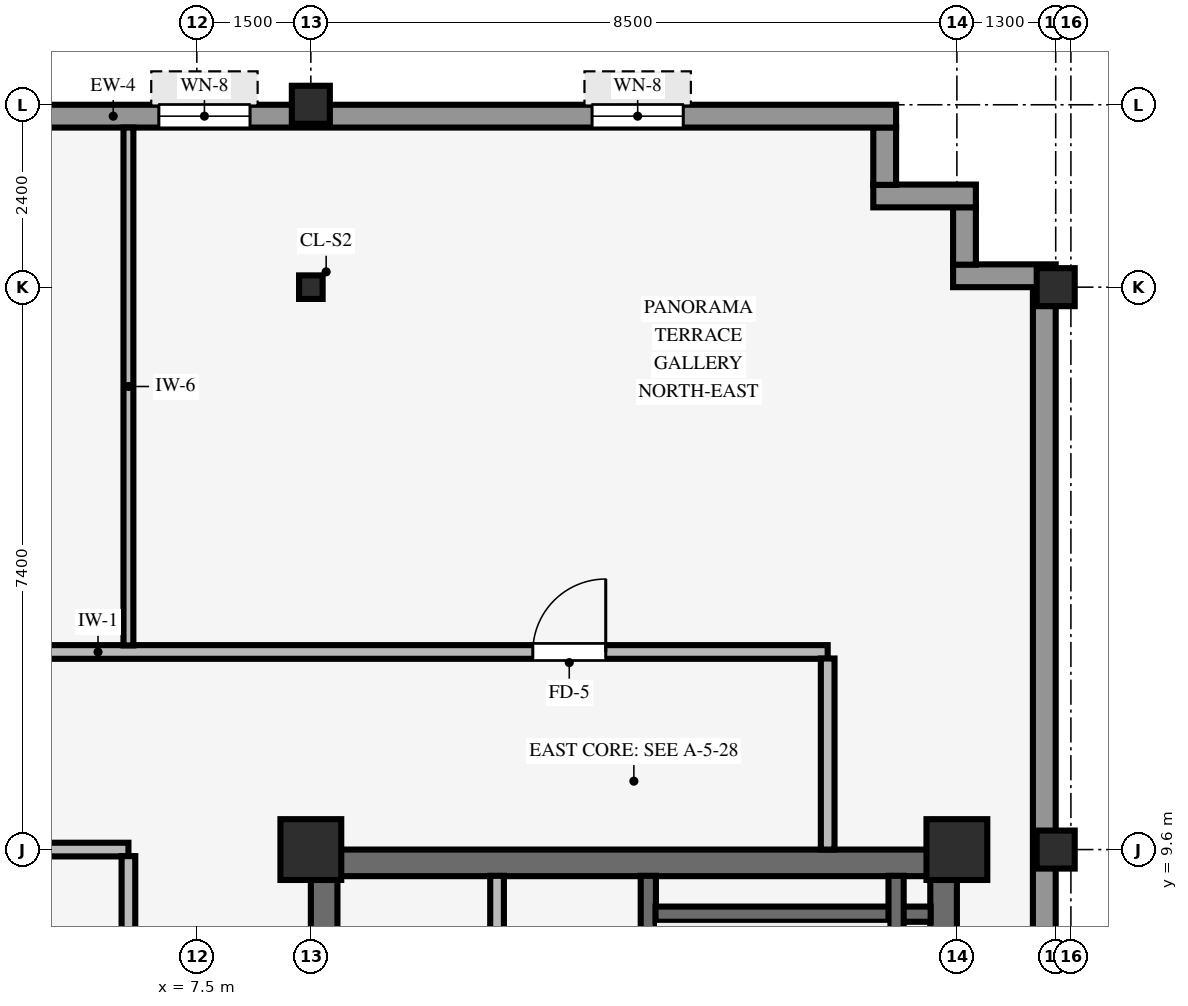
"""IFC4 building model, lengths in metres.
Left out: names, types, materials, properties, quantities, classifications, styles, units other than length and angle.
Written with IfcOpenShell. Run it as: python <this file> out.ifc"""

import sys

from ifc_helpers import new_model, si_unit, direction, frame, frame_2d, origin, origin_2d, place, context, subcontext, project, spatial, rectangle, hollow_rectangle, i_section, extrude, source, transform, mapped, element, fill, save


model = new_model("IFC4")
c1 = context("Model", 3, precision=1e-05, world=origin(), true_north=direction((0.0, 1.0)))
c2 = subcontext(c1, "Body", "Model", "MODEL_VIEW")
j1 = project(units=[si_unit("LENGTHUNIT", "METRE"), si_unit("PLANEANGLEUNIT", "RADIAN")], contexts=[c1])
p1 = place(None, origin())
s1 = spatial("IfcSite", under=j1, at=p1, CompositionType="ELEMENT")
p2 = place(p1, origin())
s2 = spatial("IfcBuilding", under=s1, at=p2, CompositionType="ELEMENT")
p3 = place(p2, frame((0.0, 0.0, 283.5)))
s3 = spatial("IfcBuildingStorey", under=s2, at=p3, CompositionType="ELEMENT", Elevation=283.5)
p4 = place(p3, frame((9.0, 9.425, 0.0), z_axis=(0.0, 0.0, 1.0), x_axis=(1.0, 0.0, 0.0)))
e1 = element("IfcWall", 1, at=p4, inside=s3, PredefinedType="SHEAR", context=c2, shape_type="SweptSolid", body=[
    extrude(rectangle(XDim=8.5, YDim=0.35, at=frame_2d((4.25, 0.0))), origin(), (0.0, 0.0, 1.0), 3.25),
])
p5 = place(p3, frame((9.175, -9.255, 0.0), z_axis=(0.0, 0.0, 1.0), x_axis=(0.0, 1.0, 0.0)))
e2 = element("IfcWall", 2, at=p5, inside=s3, PredefinedType="SHEAR", context=c2, shape_type="SweptSolid", body=[
    extrude(rectangle(XDim=18.51, YDim=0.35, at=frame_2d((9.255, 0.0))), origin(), (0.0, 0.0, 1.0), 3.25),
])
p6 = place(p5, frame((8.655, 0.0, 0.0)))
e3 = element("IfcOpeningElement", 3, at=p6, cuts=e2, PredefinedType="OPENING", context=c2, shape_type="SweptSolid", body=[
    extrude(rectangle(XDim=1.2, YDim=2.15, at=frame_2d((0.6, 1.075))), frame((0.0, 0.185, 0.0), z_axis=(0.0, -1.0, 0.0), x_axis=(1.0, 0.0, 0.0)), (0.0, 0.0, 1.0), 0.37),
])
p7 = place(p3, frame((17.325, -9.255, 0.0), z_axis=(0.0, 0.0, 1.0), x_axis=(0.0, 1.0, 0.0)))
e4 = element("IfcWall", 4, at=p7, inside=s3, PredefinedType="SHEAR", context=c2, shape_type="SweptSolid", body=[
    extrude(rectangle(XDim=18.51, YDim=0.35, at=frame_2d((9.255, 0.0))), origin(), (0.0, 0.0, 1.0), 3.25),
])
for number, where, z_axis, x_axis in (
    (5, (9.0, 9.6, 0.0), (0.0, 0.0, 1.0), (1.0, 0.0, 0.0)),
    (6, (17.5, 9.6, 0.0), (0.0, 0.0, 1.0), (1.0, 0.0, 0.0)),
):
    element("IfcColumn", number, at=place(p3, frame(where, z_axis=z_axis, x_axis=x_axis)), inside=s3, PredefinedType="COLUMN", context=c2, shape_type="SweptSolid", body=[
        extrude(rectangle(XDim=0.8, YDim=0.8, at=origin_2d()), origin(), (0.0, 0.0, 1.0), 3.25),
    ])
for number, where, z_axis, x_axis in (
    (7, (18.8, 9.6, 0.0), (0.0, 0.0, 1.0), (1.0, 0.0, 0.0)),
    (8, (18.8, 17.0, 0.0), (0.0, 0.0, 1.0), (1.0, 0.0, 0.0)),
    (9, (9.0, 19.4, 0.0), (0.0, 0.0, 1.0), (1.0, 0.0, 0.0)),
):
    element("IfcColumn", number, at=place(p3, frame(where, z_axis=z_axis, x_axis=x_axis)), inside=s3, PredefinedType="COLUMN", context=c2, shape_type="SweptSolid", body=[
        extrude(hollow_rectangle(XDim=0.5, YDim=0.5, WallThickness=0.032, InnerFilletRadius=0.032, OuterFilletRadius=0.064, at=origin_2d()), origin(), (0.0, 0.0, 1.0), 3.25),
    ])
p8 = place(p3, frame((9.0, 17.0, 0.0), z_axis=(0.0, 0.0, 1.0), x_axis=(1.0, 0.0, 0.0)))
e10 = element("IfcColumn", 10, at=p8, inside=s3, PredefinedType="COLUMN", context=c2, shape_type="SweptSolid", body=[
    extrude(i_section(OverallWidth=0.31, OverallDepth=0.31, WebThickness=0.015, FlangeThickness=0.015, FilletRadius=0.015, at=origin_2d()), origin(), (0.0, 0.0, 1.0), 3.25),
])
p9 = place(p3, frame((18.65, 3.6, 0.0), z_axis=(0.0, 0.0, 1.0), x_axis=(0.0, 1.0, 0.0)))
e11 = element("IfcWall", 11, at=p9, inside=s3, PredefinedType="STANDARD", context=c2, shape_type="SweptSolid", body=[
    extrude(rectangle(XDim=13.404, YDim=0.3, at=frame_2d((6.702, 0.0))), origin(), (0.0, 0.0, 1.0), 2.585),
])
p10 = place(p3, frame((17.45, 17.15, 0.0), z_axis=(0.0, 0.0, 1.0), x_axis=(1.0, 0.0, 0.0)))
e12 = element("IfcWall", 12, at=p10, inside=s3, PredefinedType="STANDARD", context=c2, shape_type="SweptSolid", body=[
    extrude(rectangle(XDim=1.35, YDim=0.3, at=frame_2d((0.675, 0.0))), origin(), (0.0, 0.0, 1.0), 3.24),
])
p11 = place(p3, frame((17.6, 17.296, 0.0), z_axis=(0.0, 0.0, 1.0), x_axis=(0.0, 1.0, 0.0)))
e13 = element("IfcWall", 13, at=p11, inside=s3, PredefinedType="STANDARD", context=c2, shape_type="SweptSolid", body=[
    extrude(rectangle(XDim=0.758, YDim=0.3, at=frame_2d((0.379, 0.0))), origin(), (0.0, 0.0, 1.0), 3.24),
])
p12 = place(p3, frame((16.4, 18.2, 0.0), z_axis=(0.0, 0.0, 1.0), x_axis=(1.0, 0.0, 0.0)))
e14 = element("IfcWall", 14, at=p12, inside=s3, PredefinedType="STANDARD", context=c2, shape_type="SweptSolid", body=[
    extrude(rectangle(XDim=1.35, YDim=0.3, at=frame_2d((0.675, 0.0))), origin(), (0.0, 0.0, 1.0), 3.24),
])
p13 = place(p3, frame((16.55, 18.346, 0.0), z_axis=(0.0, 0.0, 1.0), x_axis=(0.0, 1.0, 0.0)))
e15 = element("IfcWall", 15, at=p13, inside=s3, PredefinedType="STANDARD", context=c2, shape_type="SweptSolid", body=[
    extrude(rectangle(XDim=0.758, YDim=0.3, at=frame_2d((0.379, 0.0))), origin(), (0.0, 0.0, 1.0), 3.24),
])
p14 = place(p3, frame((-18.9, 19.25, 0.0), z_axis=(0.0, 0.0, 1.0), x_axis=(1.0, 0.0, 0.0)))
e16 = element("IfcWall", 16, at=p14, inside=s3, PredefinedType="STANDARD", context=c2, shape_type="SweptSolid", body=[
    extrude(rectangle(XDim=35.6, YDim=0.3, at=frame_2d((17.8, 0.0))), origin(), (0.0, 0.0, 1.0), 3.24),
])
p15 = place(p14, frame((13.5, 0.0, 0.0)))
e17 = element("IfcOpeningElement", 17, at=p15, cuts=e16, PredefinedType="OPENING", context=c2, shape_type="SweptSolid", body=[
    extrude(rectangle(XDim=1.05, YDim=2.1, at=frame_2d((0.525, 1.05))), frame((0.0, 0.16, 0.0), z_axis=(0.0, -1.0, 0.0), x_axis=(1.0, 0.0, 0.0)), (0.0, 0.0, 1.0), 0.32),
])
p16 = place(p14, frame((2.8, 0.0, 0.8)))
e18 = element("IfcOpeningElement", 18, at=p16, cuts=e16, PredefinedType="OPENING", context=c2, shape_type="SweptSolid", body=[
    extrude(rectangle(XDim=1.2, YDim=1.48, at=frame_2d((0.6, 0.74))), frame((0.0, 0.16, 0.0), z_axis=(0.0, -1.0, 0.0), x_axis=(1.0, 0.0, 0.0)), (0.0, 0.0, 1.0), 0.32),
])
p17 = place(p14, frame((7.6, 0.0, 0.8)))
e19 = element("IfcOpeningElement", 19, at=p17, cuts=e16, PredefinedType="OPENING", context=c2, shape_type="SweptSolid", body=[
    extrude(rectangle(XDim=1.2, YDim=1.48, at=frame_2d((0.6, 0.74))), frame((0.0, 0.16, 0.0), z_axis=(0.0, -1.0, 0.0), x_axis=(1.0, 0.0, 0.0)), (0.0, 0.0, 1.0), 0.32),
])
p18 = place(p14, frame((16.75, 0.0, 0.8)))
e20 = element("IfcOpeningElement", 20, at=p18, cuts=e16, PredefinedType="OPENING", context=c2, shape_type="SweptSolid", body=[
    extrude(rectangle(XDim=1.2, YDim=1.48, at=frame_2d((0.6, 0.74))), frame((0.0, 0.16, 0.0), z_axis=(0.0, -1.0, 0.0), x_axis=(1.0, 0.0, 0.0)), (0.0, 0.0, 1.0), 0.32),
])
p19 = place(p14, frame((22.0, 0.0, 0.8)))
e21 = element("IfcOpeningElement", 21, at=p19, cuts=e16, PredefinedType="OPENING", context=c2, shape_type="SweptSolid", body=[
    extrude(rectangle(XDim=1.2, YDim=1.48, at=frame_2d((0.6, 0.74))), frame((0.0, 0.16, 0.0), z_axis=(0.0, -1.0, 0.0), x_axis=(1.0, 0.0, 0.0)), (0.0, 0.0, 1.0), 0.32),
])
p20 = place(p14, frame((25.9, 0.0, 0.8)))
e22 = element("IfcOpeningElement", 22, at=p20, cuts=e16, PredefinedType="OPENING", context=c2, shape_type="SweptSolid", body=[
    extrude(rectangle(XDim=1.2, YDim=1.48, at=frame_2d((0.6, 0.74))), frame((0.0, 0.16, 0.0), z_axis=(0.0, -1.0, 0.0), x_axis=(1.0, 0.0, 0.0)), (0.0, 0.0, 1.0), 0.32),
])
p21 = place(p14, frame((31.6, 0.0, 0.8)))
e23 = element("IfcOpeningElement", 23, at=p21, cuts=e16, PredefinedType="OPENING", context=c2, shape_type="SweptSolid", body=[
    extrude(rectangle(XDim=1.2, YDim=1.48, at=frame_2d((0.6, 0.74))), frame((0.0, 0.16, 0.0), z_axis=(0.0, -1.0, 0.0), x_axis=(1.0, 0.0, 0.0)), (0.0, 0.0, 1.0), 0.32),
])
p22 = place(p3, frame((13.44, 0.9, 0.0), z_axis=(0.0, 0.0, 1.0), x_axis=(0.0, 1.0, 0.0)))
e24 = element("IfcWall", 24, at=p22, inside=s3, PredefinedType="SHEAR", context=c2, shape_type="SweptSolid", body=[
    extrude(rectangle(XDim=8.355, YDim=0.2, at=frame_2d((4.177, 0.0))), origin(), (0.0, 0.0, 1.0), 3.25),
])
p23 = place(p22, frame((0.43, 0.0, 0.0)))
e25 = element("IfcOpeningElement", 25, at=p23, cuts=e24, PredefinedType="OPENING", context=c2, shape_type="SweptSolid", body=[
    extrude(rectangle(XDim=1.1, YDim=2.15, at=frame_2d((0.55, 1.075))), frame((0.0, 0.11, 0.0), z_axis=(0.0, -1.0, 0.0), x_axis=(1.0, 0.0, 0.0)), (0.0, 0.0, 1.0), 0.22),
])
p24 = place(p3, frame((13.535, 8.75, 0.0), z_axis=(0.0, 0.0, 1.0), x_axis=(1.0, 0.0, 0.0)))
e26 = element("IfcWall", 26, at=p24, inside=s3, PredefinedType="SHEAR", context=c2, shape_type="SweptSolid", body=[
    extrude(rectangle(XDim=3.62, YDim=0.2, at=frame_2d((1.81, 0.0))), origin(), (0.0, 0.0, 1.0), 3.25),
])
p25 = place(p3, frame((16.7, 1.095, 0.0), z_axis=(0.0, 0.0, 1.0), x_axis=(0.0, 1.0, 0.0)))
e27 = element("IfcWall", 27, at=p25, inside=s3, PredefinedType="SHEAR", context=c2, shape_type="SweptSolid", body=[
    extrude(rectangle(XDim=8.16, YDim=0.2, at=frame_2d((4.08, 0.0))), origin(), (0.0, 0.0, 1.0), 3.25),
])
p26 = place(p3, frame((11.45, 4.19, 0.0), z_axis=(0.0, 0.0, 1.0), x_axis=(0.0, 1.0, 0.0)))
e28 = element("IfcWall", 28, at=p26, inside=s3, PredefinedType="PARTITIONING", context=c2, shape_type="SweptSolid", body=[
    extrude(rectangle(XDim=5.065, YDim=0.18, at=frame_2d((2.532, 0.0))), origin(), (0.0, 0.0, 1.0), 3.24),
])
p27 = place(p3, frame((0.151, 9.6, 0.0), z_axis=(0.0, 0.0, 1.0), x_axis=(1.0, 0.0, 0.0)))
e29 = element("IfcWall", 29, at=p27, inside=s3, PredefinedType="PARTITIONING", context=c2, shape_type="SweptSolid", body=[
    extrude(rectangle(XDim=6.449, YDim=0.18, at=frame_2d((3.225, 0.0))), origin(), (0.0, 0.0, 1.0), 2.285),
])
p28 = place(p3, frame((-9.0, 12.2, 0.0), z_axis=(0.0, 0.0, 1.0), x_axis=(1.0, 0.0, 0.0)))
e30 = element("IfcWall", 30, at=p28, inside=s3, PredefinedType="PARTITIONING", context=c2, shape_type="SweptSolid", body=[
    extrude(rectangle(XDim=24.8, YDim=0.18, at=frame_2d((12.4, 0.0))), origin(), (0.0, 0.0, 1.0), 3.24),
])
p29 = place(p28, frame((8.52, 0.0, 0.0)))
e31 = element("IfcOpeningElement", 31, at=p29, cuts=e30, PredefinedType="OPENING", context=c2, shape_type="SweptSolid", body=[
    extrude(rectangle(XDim=0.96, YDim=2.1, at=frame_2d((0.48, 1.05))), frame((0.0, 0.1, 0.0), z_axis=(0.0, -1.0, 0.0), x_axis=(1.0, 0.0, 0.0)), (0.0, 0.0, 1.0), 0.2),
])
p30 = place(p28, frame((20.92, 0.0, 0.0)))
e32 = element("IfcOpeningElement", 32, at=p30, cuts=e30, PredefinedType="OPENING", context=c2, shape_type="SweptSolid", body=[
    extrude(rectangle(XDim=0.96, YDim=2.1, at=frame_2d((0.48, 1.05))), frame((0.0, 0.1, 0.0), z_axis=(0.0, -1.0, 0.0), x_axis=(1.0, 0.0, 0.0)), (0.0, 0.0, 1.0), 0.2),
])
p31 = place(p28, frame((0.75, 0.0, 0.0)))
e33 = element("IfcOpeningElement", 33, at=p31, cuts=e30, PredefinedType="OPENING", context=c2, shape_type="SweptSolid", body=[
    extrude(rectangle(XDim=0.9, YDim=2.1, at=frame_2d((0.45, 1.05))), frame((0.0, 0.1, 0.0), z_axis=(0.0, -1.0, 0.0), x_axis=(1.0, 0.0, 0.0)), (0.0, 0.0, 1.0), 0.2),
])
p32 = place(p3, frame((6.6, 1.336, 0.0), z_axis=(0.0, 0.0, 1.0), x_axis=(0.0, 1.0, 0.0)))
e34 = element("IfcWall", 34, at=p32, inside=s3, PredefinedType="PARTITIONING", context=c2, shape_type="SweptSolid", body=[
    extrude(rectangle(XDim=8.178, YDim=0.18, at=frame_2d((4.089, 0.0))), origin(), (0.0, 0.0, 1.0), 3.24),
])
p33 = place(p3, frame((6.6, 12.286, 0.0), z_axis=(0.0, 0.0, 1.0), x_axis=(0.0, 1.0, 0.0)))
e35 = element("IfcWall", 35, at=p33, inside=s3, PredefinedType="PARTITIONING", context=c2, shape_type="SweptSolid", body=[
    extrude(rectangle(XDim=6.814, YDim=0.13, at=frame_2d((3.407, 0.0))), origin(), (0.0, 0.0, 1.0), 3.24),
])
p34 = place(p3, frame((15.8, 9.6, 0.0), z_axis=(0.0, 0.0, 1.0), x_axis=(0.0, 1.0, 0.0)))
e36 = element("IfcWall", 36, at=p34, inside=s3, PredefinedType="PARTITIONING", context=c2, shape_type="SweptSolid", body=[
    extrude(rectangle(XDim=2.514, YDim=0.18, at=frame_2d((1.257, 0.0))), origin(), (0.0, 0.0, 1.0), 3.24),
])
m1 = source(origin(), c2, "Body", "SweptSolid", [
    extrude(rectangle(XDim=1.2, YDim=1.48, at=frame_2d((0.6, 0.74))), frame((0.0, 0.03, 0.0), z_axis=(0.0, -1.0, 0.0), x_axis=(1.0, 0.0, 0.0)), (0.0, 0.0, 1.0), 0.06),
])
p35 = place(p20, origin())
e37 = element("IfcWindow", 37, at=p35, inside=s3, PartitioningType="SINGLE_PANEL", PredefinedType="WINDOW", context=c2, shape_type="MappedRepresentation", body=[
    mapped(m1, transform((0.0, 0.0, 0.0), scale=1.0)),
])
fill(e22, e37)
p36 = place(p21, origin())
e38 = element("IfcWindow", 38, at=p36, inside=s3, PartitioningType="SINGLE_PANEL", PredefinedType="WINDOW", context=c2, shape_type="MappedRepresentation", body=[
    mapped(m1, transform((0.0, 0.0, 0.0), scale=1.0)),
])
fill(e23, e38)
m2 = source(origin(), c2, "Body", "SweptSolid", [
    extrude(rectangle(XDim=0.96, YDim=2.1, at=frame_2d((0.48, 1.05))), frame((0.0, 0.025, 0.0), z_axis=(0.0, -1.0, 0.0), x_axis=(1.0, 0.0, 0.0)), (0.0, 0.0, 1.0), 0.05),
])
p37 = place(p30, origin())
e39 = element("IfcDoor", 39, at=p37, inside=s3, OperationType="SINGLE_SWING_RIGHT", PredefinedType="DOOR", context=c2, shape_type="MappedRepresentation", body=[
    mapped(m2, transform((0.0, 0.0, 0.0), scale=1.0)),
])
fill(e32, e39)
save(model, sys.argv[1])
